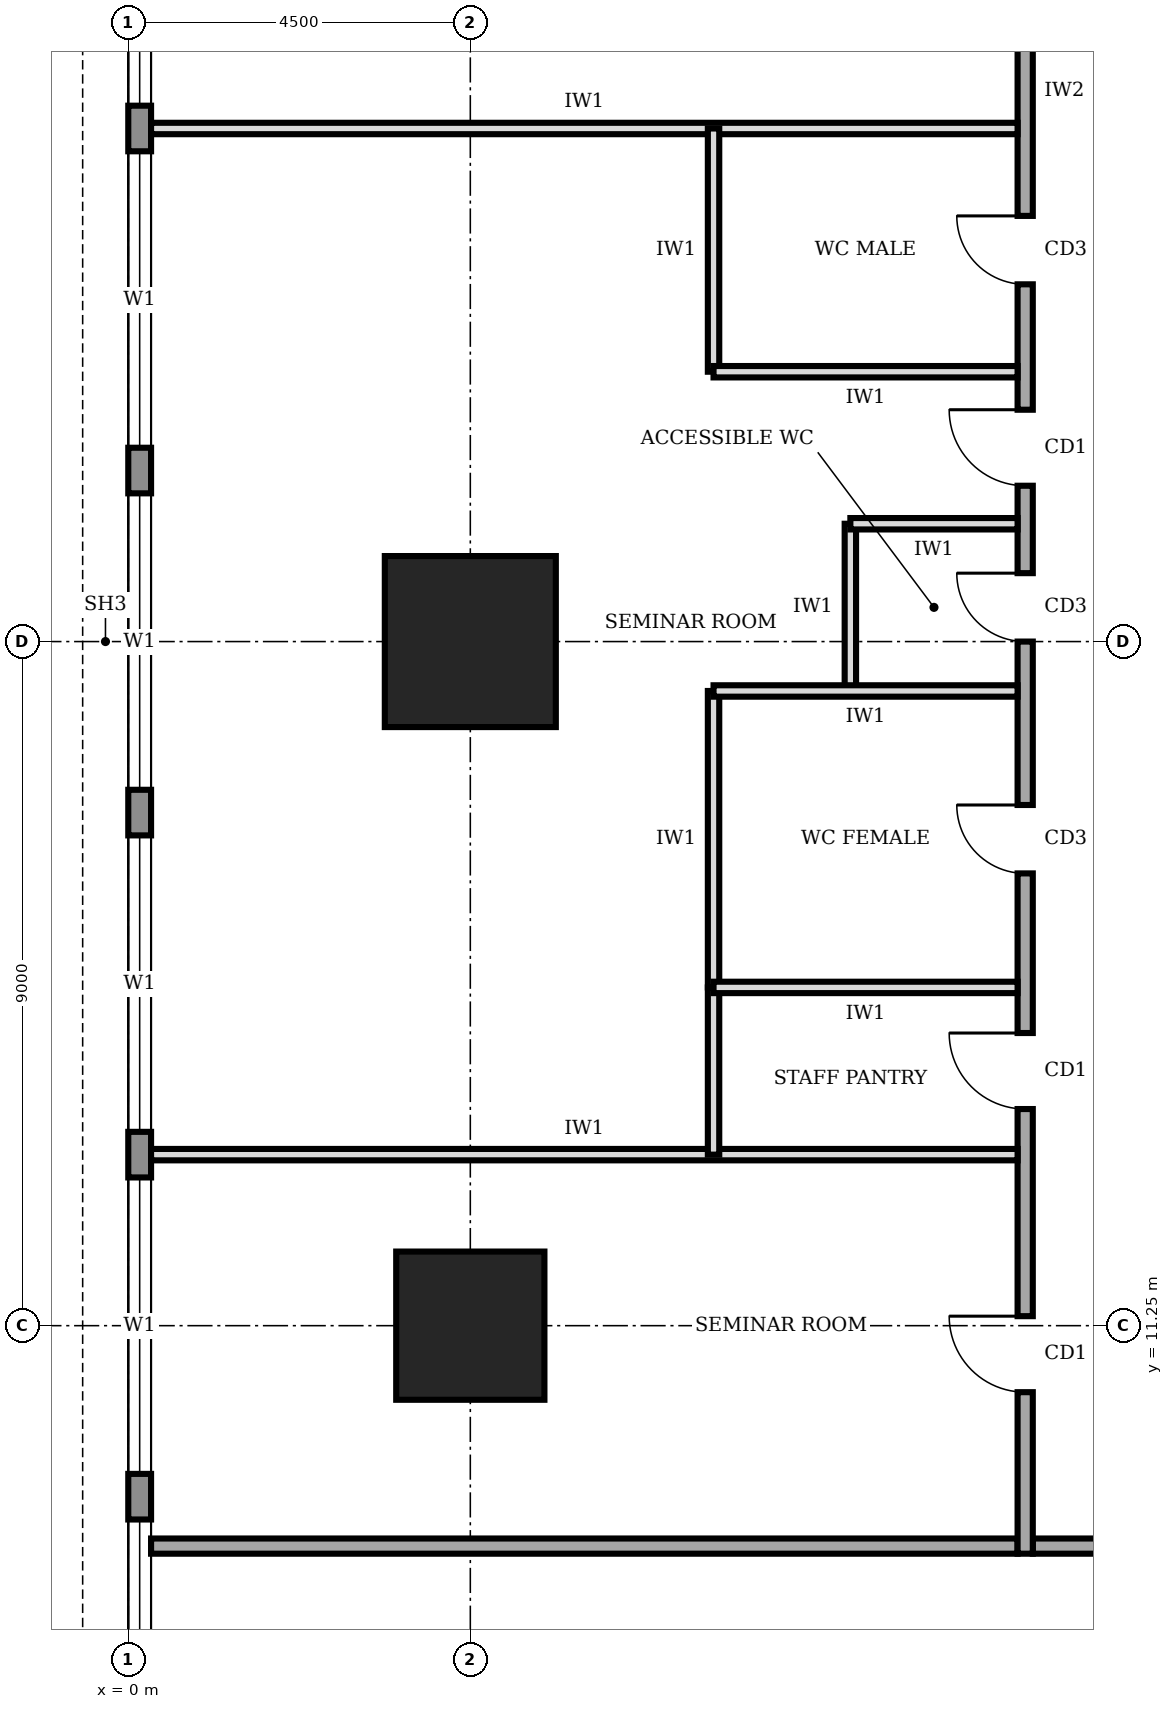
"""IFC4 building model, lengths in metres.
Left out: names, types, materials, properties, quantities, classifications, styles, units other than length and angle.
Written with IfcOpenShell. Run it as: python <this file> out.ifc"""

import sys

from ifc_helpers import new_model, si_unit, direction, frame, frame_2d, origin, origin_2d, place, context, subcontext, project, spatial, rectangle, extrude, element, fill, save


model = new_model("IFC4")
c1 = context("Model", 3, precision=1e-05, world=origin(), true_north=direction((0.0, 1.0)))
c2 = subcontext(c1, "Body", "Model", "MODEL_VIEW")
j1 = project(units=[si_unit("LENGTHUNIT", "METRE"), si_unit("PLANEANGLEUNIT", "RADIAN")], contexts=[c1])
p1 = place(None, origin())
s1 = spatial("IfcSite", under=j1, at=p1, CompositionType="ELEMENT")
p2 = place(p1, origin())
s2 = spatial("IfcBuilding", under=s1, at=p2, CompositionType="ELEMENT")
p3 = place(p2, frame((0.0, 0.0, 225.0)))
s3 = spatial("IfcBuildingStorey", under=s2, at=p3, CompositionType="ELEMENT", Elevation=225.0)
p4 = place(p3, frame((4.5, 11.25, 0.0), z_axis=(0.0, 0.0, 1.0), x_axis=(1.0, 0.0, 0.0)))
e1 = element("IfcColumn", 1, at=p4, inside=s3, PredefinedType="COLUMN", context=c2, shape_type="SweptSolid", body=[
    extrude(rectangle(XDim=1.95, YDim=1.95, at=origin_2d()), origin(), (0.0, 0.0, 1.0), 4.0),
])
p5 = place(p3, frame((4.5, 20.25, 0.0), z_axis=(0.0, 0.0, 1.0), x_axis=(1.0, 0.0, 0.0)))
e2 = element("IfcColumn", 2, at=p5, inside=s3, PredefinedType="COLUMN", context=c2, shape_type="SweptSolid", body=[
    extrude(rectangle(XDim=2.25, YDim=2.25, at=origin_2d()), origin(), (0.0, 0.0, 1.0), 4.0),
])
p6 = place(p3, frame((0.15, 35.98, 0.0), z_axis=(0.0, 0.0, 1.0), x_axis=(0.0, -1.0, 0.0)))
e3 = element("IfcWall", 3, at=p6, inside=s3, PredefinedType="STANDARD", context=c2, shape_type="SweptSolid", body=[
    extrude(rectangle(XDim=31.46, YDim=0.3, at=frame_2d((15.73, 0.0))), origin(), (0.0, 0.0, 1.0), 3.75),
])
p7 = place(p6, frame((27.28, 0.0, 0.9)))
e4 = element("IfcOpeningElement", 4, at=p7, cuts=e3, PredefinedType="OPENING", context=c2, shape_type="SweptSolid", body=[
    extrude(rectangle(XDim=3.9, YDim=2.2, at=frame_2d((1.95, 1.1))), frame((0.0, 0.16, 0.0), z_axis=(0.0, -1.0, 0.0), x_axis=(1.0, 0.0, 0.0)), (0.0, 0.0, 1.0), 0.32),
])
p8 = place(p6, frame((22.78, 0.0, 0.9)))
e5 = element("IfcOpeningElement", 5, at=p8, cuts=e3, PredefinedType="OPENING", context=c2, shape_type="SweptSolid", body=[
    extrude(rectangle(XDim=3.9, YDim=2.2, at=frame_2d((1.95, 1.1))), frame((0.0, 0.16, 0.0), z_axis=(0.0, -1.0, 0.0), x_axis=(1.0, 0.0, 0.0)), (0.0, 0.0, 1.0), 0.32),
])
p9 = place(p6, frame((18.28, 0.0, 0.9)))
e6 = element("IfcOpeningElement", 6, at=p9, cuts=e3, PredefinedType="OPENING", context=c2, shape_type="SweptSolid", body=[
    extrude(rectangle(XDim=3.9, YDim=2.2, at=frame_2d((1.95, 1.1))), frame((0.0, 0.16, 0.0), z_axis=(0.0, -1.0, 0.0), x_axis=(1.0, 0.0, 0.0)), (0.0, 0.0, 1.0), 0.32),
])
p10 = place(p6, frame((13.78, 0.0, 0.9)))
e7 = element("IfcOpeningElement", 7, at=p10, cuts=e3, PredefinedType="OPENING", context=c2, shape_type="SweptSolid", body=[
    extrude(rectangle(XDim=3.9, YDim=2.2, at=frame_2d((1.95, 1.1))), frame((0.0, 0.16, 0.0), z_axis=(0.0, -1.0, 0.0), x_axis=(1.0, 0.0, 0.0)), (0.0, 0.0, 1.0), 0.32),
])
p11 = place(p6, frame((9.28, 0.0, 0.9)))
e8 = element("IfcOpeningElement", 8, at=p11, cuts=e3, PredefinedType="OPENING", context=c2, shape_type="SweptSolid", body=[
    extrude(rectangle(XDim=3.9, YDim=2.2, at=frame_2d((1.95, 1.1))), frame((0.0, 0.16, 0.0), z_axis=(0.0, -1.0, 0.0), x_axis=(1.0, 0.0, 0.0)), (0.0, 0.0, 1.0), 0.32),
])
p12 = place(p6, frame((4.78, 0.0, 0.9)))
e9 = element("IfcOpeningElement", 9, at=p12, cuts=e3, PredefinedType="OPENING", context=c2, shape_type="SweptSolid", body=[
    extrude(rectangle(XDim=3.9, YDim=2.2, at=frame_2d((1.95, 1.1))), frame((0.0, 0.16, 0.0), z_axis=(0.0, -1.0, 0.0), x_axis=(1.0, 0.0, 0.0)), (0.0, 0.0, 1.0), 0.32),
])
p13 = place(p3, frame((11.9, 8.35, 0.0), z_axis=(0.0, 0.0, 1.0), x_axis=(1.0, 0.0, 0.0)))
e10 = element("IfcWall", 10, at=p13, inside=s3, PredefinedType="SOLIDWALL", context=c2, shape_type="SweptSolid", body=[
    extrude(rectangle(XDim=16.9, YDim=0.2, at=frame_2d((8.45, 0.0))), origin(), (0.0, 0.0, 1.0), 3.75),
])
p14 = place(p13, frame((2.05, 0.0, 0.0)))
e11 = element("IfcOpeningElement", 11, at=p14, cuts=e10, PredefinedType="OPENING", context=c2, shape_type="SweptSolid", body=[
    extrude(rectangle(XDim=1.8, YDim=2.1, at=frame_2d((0.9, 1.05))), frame((0.0, 0.11, 0.0), z_axis=(0.0, -1.0, 0.0), x_axis=(1.0, 0.0, 0.0)), (0.0, 0.0, 1.0), 0.22),
])
p15 = place(p13, frame((10.6, 0.0, 0.0)))
e12 = element("IfcOpeningElement", 12, at=p15, cuts=e10, PredefinedType="OPENING", context=c2, shape_type="SweptSolid", body=[
    extrude(rectangle(XDim=1.8, YDim=2.1, at=frame_2d((0.9, 1.05))), frame((0.0, 0.11, 0.0), z_axis=(0.0, -1.0, 0.0), x_axis=(1.0, 0.0, 0.0)), (0.0, 0.0, 1.0), 0.22),
])
p16 = place(p3, frame((11.8, 32.05, 0.0), z_axis=(0.0, 0.0, 1.0), x_axis=(0.0, -1.0, 0.0)))
e13 = element("IfcWall", 13, at=p16, inside=s3, PredefinedType="SOLIDWALL", context=c2, shape_type="SweptSolid", body=[
    extrude(rectangle(XDim=23.8, YDim=0.2, at=frame_2d((11.9, 0.0))), origin(), (0.0, 0.0, 1.0), 3.75),
])
p17 = place(p16, frame((20.675, 0.0, 0.0)))
e14 = element("IfcOpeningElement", 14, at=p17, cuts=e13, PredefinedType="OPENING", context=c2, shape_type="SweptSolid", body=[
    extrude(rectangle(XDim=1.0, YDim=2.1, at=frame_2d((0.5, 1.05))), frame((0.0, 0.11, 0.0), z_axis=(0.0, -1.0, 0.0), x_axis=(1.0, 0.0, 0.0)), (0.0, 0.0, 1.0), 0.22),
])
p18 = place(p16, frame((16.95, 0.0, 0.0)))
e15 = element("IfcOpeningElement", 15, at=p18, cuts=e13, PredefinedType="OPENING", context=c2, shape_type="SweptSolid", body=[
    extrude(rectangle(XDim=1.0, YDim=2.1, at=frame_2d((0.5, 1.05))), frame((0.0, 0.11, 0.0), z_axis=(0.0, -1.0, 0.0), x_axis=(1.0, 0.0, 0.0)), (0.0, 0.0, 1.0), 0.22),
])
p19 = place(p16, frame((13.95, 0.0, 0.0)))
e16 = element("IfcOpeningElement", 16, at=p19, cuts=e13, PredefinedType="OPENING", context=c2, shape_type="SweptSolid", body=[
    extrude(rectangle(XDim=0.9, YDim=2.1, at=frame_2d((0.45, 1.05))), frame((0.0, 0.11, 0.0), z_axis=(0.0, -1.0, 0.0), x_axis=(1.0, 0.0, 0.0)), (0.0, 0.0, 1.0), 0.22),
])
p20 = place(p16, frame((10.9, 0.0, 0.0)))
e17 = element("IfcOpeningElement", 17, at=p20, cuts=e13, PredefinedType="OPENING", context=c2, shape_type="SweptSolid", body=[
    extrude(rectangle(XDim=0.9, YDim=2.1, at=frame_2d((0.45, 1.05))), frame((0.0, 0.11, 0.0), z_axis=(0.0, -1.0, 0.0), x_axis=(1.0, 0.0, 0.0)), (0.0, 0.0, 1.0), 0.22),
])
p21 = place(p16, frame((6.2, 0.0, 0.0)))
e18 = element("IfcOpeningElement", 18, at=p21, cuts=e13, PredefinedType="OPENING", context=c2, shape_type="SweptSolid", body=[
    extrude(rectangle(XDim=0.9, YDim=2.1, at=frame_2d((0.45, 1.05))), frame((0.0, 0.11, 0.0), z_axis=(0.0, -1.0, 0.0), x_axis=(1.0, 0.0, 0.0)), (0.0, 0.0, 1.0), 0.22),
])
p22 = place(p16, frame((8.75, 0.0, 0.0)))
e19 = element("IfcOpeningElement", 19, at=p22, cuts=e13, PredefinedType="OPENING", context=c2, shape_type="SweptSolid", body=[
    extrude(rectangle(XDim=1.0, YDim=2.1, at=frame_2d((0.5, 1.05))), frame((0.0, 0.11, 0.0), z_axis=(0.0, -1.0, 0.0), x_axis=(1.0, 0.0, 0.0)), (0.0, 0.0, 1.0), 0.22),
])
p23 = place(p16, frame((1.925, 0.0, 0.0)))
e20 = element("IfcOpeningElement", 20, at=p23, cuts=e13, PredefinedType="OPENING", context=c2, shape_type="SweptSolid", body=[
    extrude(rectangle(XDim=1.0, YDim=2.1, at=frame_2d((0.5, 1.05))), frame((0.0, 0.11, 0.0), z_axis=(0.0, -1.0, 0.0), x_axis=(1.0, 0.0, 0.0)), (0.0, 0.0, 1.0), 0.22),
])
p24 = place(p3, frame((0.3, 8.35, 0.0), z_axis=(0.0, 0.0, 1.0), x_axis=(1.0, 0.0, 0.0)))
e21 = element("IfcWall", 21, at=p24, inside=s3, PredefinedType="SOLIDWALL", context=c2, shape_type="SweptSolid", body=[
    extrude(rectangle(XDim=11.4, YDim=0.2, at=frame_2d((5.7, 0.0))), origin(), (0.0, 0.0, 1.0), 3.75),
])
for number, where, z_axis, x_axis in (
    (22, (0.3, 13.5, 0.0), (0.0, 0.0, 1.0), (1.0, 0.0, 0.0)),
    (23, (0.3, 27.0, 0.0), (0.0, 0.0, 1.0), (1.0, 0.0, 0.0)),
):
    element("IfcWall", number, at=place(p3, frame(where, z_axis=z_axis, x_axis=x_axis)), inside=s3, PredefinedType="PARTITIONING", context=c2, shape_type="SweptSolid", body=[
        extrude(rectangle(XDim=11.4, YDim=0.15, at=frame_2d((5.7, 0.0))), origin(), (0.0, 0.0, 1.0), 3.75),
    ])
p25 = place(p3, frame((11.7, 15.7, 0.0), z_axis=(0.0, 0.0, 1.0), x_axis=(-1.0, 0.0, 0.0)))
e24 = element("IfcWall", 24, at=p25, inside=s3, PredefinedType="PARTITIONING", context=c2, shape_type="SweptSolid", body=[
    extrude(rectangle(XDim=4.0, YDim=0.15, at=frame_2d((2.0, 0.0))), origin(), (0.0, 0.0, 1.0), 3.75),
])
p26 = place(p3, frame((11.7, 19.6, 0.0), z_axis=(0.0, 0.0, 1.0), x_axis=(-1.0, 0.0, 0.0)))
e25 = element("IfcWall", 25, at=p26, inside=s3, PredefinedType="PARTITIONING", context=c2, shape_type="SweptSolid", body=[
    extrude(rectangle(XDim=4.0, YDim=0.15, at=frame_2d((2.0, 0.0))), origin(), (0.0, 0.0, 1.0), 2.85),
])
p27 = place(p3, frame((11.7, 21.8, 0.0), z_axis=(0.0, 0.0, 1.0), x_axis=(-1.0, 0.0, 0.0)))
e26 = element("IfcWall", 26, at=p27, inside=s3, PredefinedType="PARTITIONING", context=c2, shape_type="SweptSolid", body=[
    extrude(rectangle(XDim=2.2, YDim=0.15, at=frame_2d((1.1, 0.0))), origin(), (0.0, 0.0, 1.0), 3.75),
])
p28 = place(p3, frame((11.7, 23.8, 0.0), z_axis=(0.0, 0.0, 1.0), x_axis=(-1.0, 0.0, 0.0)))
e27 = element("IfcWall", 27, at=p28, inside=s3, PredefinedType="PARTITIONING", context=c2, shape_type="SweptSolid", body=[
    extrude(rectangle(XDim=4.0, YDim=0.15, at=frame_2d((2.0, 0.0))), origin(), (0.0, 0.0, 1.0), 3.75),
])
p29 = place(p3, frame((7.7, 13.5, 0.0), z_axis=(0.0, 0.0, 1.0), x_axis=(0.0, 1.0, 0.0)))
e28 = element("IfcWall", 28, at=p29, inside=s3, PredefinedType="PARTITIONING", context=c2, shape_type="SweptSolid", body=[
    extrude(rectangle(XDim=2.2, YDim=0.15, at=frame_2d((1.1, 0.0))), origin(), (0.0, 0.0, 1.0), 3.75),
])
p30 = place(p3, frame((7.7, 15.7, 0.0), z_axis=(0.0, 0.0, 1.0), x_axis=(0.0, 1.0, 0.0)))
e29 = element("IfcWall", 29, at=p30, inside=s3, PredefinedType="PARTITIONING", context=c2, shape_type="SweptSolid", body=[
    extrude(rectangle(XDim=3.9, YDim=0.15, at=frame_2d((1.95, 0.0))), origin(), (0.0, 0.0, 1.0), 3.75),
])
p31 = place(p3, frame((9.5, 19.6, 0.0), z_axis=(0.0, 0.0, 1.0), x_axis=(0.0, 1.0, 0.0)))
e30 = element("IfcWall", 30, at=p31, inside=s3, PredefinedType="PARTITIONING", context=c2, shape_type="SweptSolid", body=[
    extrude(rectangle(XDim=2.2, YDim=0.15, at=frame_2d((1.1, 0.0))), origin(), (0.0, 0.0, 1.0), 3.75),
])
p32 = place(p3, frame((7.7, 23.8, 0.0), z_axis=(0.0, 0.0, 1.0), x_axis=(0.0, 1.0, 0.0)))
e31 = element("IfcWall", 31, at=p32, inside=s3, PredefinedType="PARTITIONING", context=c2, shape_type="SweptSolid", body=[
    extrude(rectangle(XDim=3.2, YDim=0.15, at=frame_2d((1.6, 0.0))), origin(), (0.0, 0.0, 1.0), 3.75),
])
p33 = place(p7, origin())
e32 = element("IfcWindow", 32, at=p33, inside=s3, PartitioningType="SINGLE_PANEL", PredefinedType="WINDOW", context=c2, shape_type="SweptSolid", body=[
    extrude(rectangle(XDim=3.9, YDim=2.2, at=frame_2d((1.95, 1.1))), frame((0.0, 0.03, 0.0), z_axis=(0.0, -1.0, 0.0), x_axis=(1.0, 0.0, 0.0)), (0.0, 0.0, 1.0), 0.06),
])
fill(e4, e32)
p34 = place(p8, origin())
e33 = element("IfcWindow", 33, at=p34, inside=s3, PartitioningType="SINGLE_PANEL", PredefinedType="WINDOW", context=c2, shape_type="SweptSolid", body=[
    extrude(rectangle(XDim=3.9, YDim=2.2, at=frame_2d((1.95, 1.1))), frame((0.0, 0.03, 0.0), z_axis=(0.0, -1.0, 0.0), x_axis=(1.0, 0.0, 0.0)), (0.0, 0.0, 1.0), 0.06),
])
fill(e5, e33)
p35 = place(p9, origin())
e34 = element("IfcWindow", 34, at=p35, inside=s3, PartitioningType="SINGLE_PANEL", PredefinedType="WINDOW", context=c2, shape_type="SweptSolid", body=[
    extrude(rectangle(XDim=3.9, YDim=2.2, at=frame_2d((1.95, 1.1))), frame((0.0, 0.03, 0.0), z_axis=(0.0, -1.0, 0.0), x_axis=(1.0, 0.0, 0.0)), (0.0, 0.0, 1.0), 0.06),
])
fill(e6, e34)
p36 = place(p10, origin())
e35 = element("IfcWindow", 35, at=p36, inside=s3, PartitioningType="SINGLE_PANEL", PredefinedType="WINDOW", context=c2, shape_type="SweptSolid", body=[
    extrude(rectangle(XDim=3.9, YDim=2.2, at=frame_2d((1.95, 1.1))), frame((0.0, 0.03, 0.0), z_axis=(0.0, -1.0, 0.0), x_axis=(1.0, 0.0, 0.0)), (0.0, 0.0, 1.0), 0.06),
])
fill(e7, e35)
p37 = place(p11, origin())
e36 = element("IfcWindow", 36, at=p37, inside=s3, PartitioningType="SINGLE_PANEL", PredefinedType="WINDOW", context=c2, shape_type="SweptSolid", body=[
    extrude(rectangle(XDim=3.9, YDim=2.2, at=frame_2d((1.95, 1.1))), frame((0.0, 0.03, 0.0), z_axis=(0.0, -1.0, 0.0), x_axis=(1.0, 0.0, 0.0)), (0.0, 0.0, 1.0), 0.06),
])
fill(e8, e36)
p38 = place(p12, origin())
e37 = element("IfcWindow", 37, at=p38, inside=s3, PartitioningType="SINGLE_PANEL", PredefinedType="WINDOW", context=c2, shape_type="SweptSolid", body=[
    extrude(rectangle(XDim=3.9, YDim=2.2, at=frame_2d((1.95, 1.1))), frame((0.0, 0.03, 0.0), z_axis=(0.0, -1.0, 0.0), x_axis=(1.0, 0.0, 0.0)), (0.0, 0.0, 1.0), 0.06),
])
fill(e9, e37)
p39 = place(p17, frame((1.0, 0.0, 0.0), z_axis=(0.0, 0.0, 1.0), x_axis=(-1.0, 0.0, 0.0)))
e38 = element("IfcDoor", 38, at=p39, inside=s3, OperationType="SINGLE_SWING_RIGHT", PredefinedType="DOOR", context=c2, shape_type="SweptSolid", body=[
    extrude(rectangle(XDim=1.0, YDim=2.1, at=frame_2d((0.5, 1.05))), frame((0.0, 0.025, 0.0), z_axis=(0.0, -1.0, 0.0), x_axis=(1.0, 0.0, 0.0)), (0.0, 0.0, 1.0), 0.05),
])
fill(e14, e38)
p40 = place(p18, frame((1.0, 0.0, 0.0), z_axis=(0.0, 0.0, 1.0), x_axis=(-1.0, 0.0, 0.0)))
e39 = element("IfcDoor", 39, at=p40, inside=s3, OperationType="SINGLE_SWING_RIGHT", PredefinedType="DOOR", context=c2, shape_type="SweptSolid", body=[
    extrude(rectangle(XDim=1.0, YDim=2.1, at=frame_2d((0.5, 1.05))), frame((0.0, 0.025, 0.0), z_axis=(0.0, -1.0, 0.0), x_axis=(1.0, 0.0, 0.0)), (0.0, 0.0, 1.0), 0.05),
])
fill(e15, e39)
p41 = place(p19, frame((0.9, 0.0, 0.0), z_axis=(0.0, 0.0, 1.0), x_axis=(-1.0, 0.0, 0.0)))
e40 = element("IfcDoor", 40, at=p41, inside=s3, OperationType="SINGLE_SWING_RIGHT", PredefinedType="DOOR", context=c2, shape_type="SweptSolid", body=[
    extrude(rectangle(XDim=0.9, YDim=2.1, at=frame_2d((0.45, 1.05))), frame((0.0, 0.025, 0.0), z_axis=(0.0, -1.0, 0.0), x_axis=(1.0, 0.0, 0.0)), (0.0, 0.0, 1.0), 0.05),
])
fill(e16, e40)
p42 = place(p20, frame((0.9, 0.0, 0.0), z_axis=(0.0, 0.0, 1.0), x_axis=(-1.0, 0.0, 0.0)))
e41 = element("IfcDoor", 41, at=p42, inside=s3, OperationType="SINGLE_SWING_RIGHT", PredefinedType="DOOR", context=c2, shape_type="SweptSolid", body=[
    extrude(rectangle(XDim=0.9, YDim=2.1, at=frame_2d((0.45, 1.05))), frame((0.0, 0.025, 0.0), z_axis=(0.0, -1.0, 0.0), x_axis=(1.0, 0.0, 0.0)), (0.0, 0.0, 1.0), 0.05),
])
fill(e17, e41)
p43 = place(p21, frame((0.9, 0.0, 0.0), z_axis=(0.0, 0.0, 1.0), x_axis=(-1.0, 0.0, 0.0)))
e42 = element("IfcDoor", 42, at=p43, inside=s3, OperationType="SINGLE_SWING_RIGHT", PredefinedType="DOOR", context=c2, shape_type="SweptSolid", body=[
    extrude(rectangle(XDim=0.9, YDim=2.1, at=frame_2d((0.45, 1.05))), frame((0.0, 0.025, 0.0), z_axis=(0.0, -1.0, 0.0), x_axis=(1.0, 0.0, 0.0)), (0.0, 0.0, 1.0), 0.05),
])
fill(e18, e42)
p44 = place(p22, frame((1.0, 0.0, 0.0), z_axis=(0.0, 0.0, 1.0), x_axis=(-1.0, 0.0, 0.0)))
e43 = element("IfcDoor", 43, at=p44, inside=s3, OperationType="SINGLE_SWING_RIGHT", PredefinedType="DOOR", context=c2, shape_type="SweptSolid", body=[
    extrude(rectangle(XDim=1.0, YDim=2.1, at=frame_2d((0.5, 1.05))), frame((0.0, 0.025, 0.0), z_axis=(0.0, -1.0, 0.0), x_axis=(1.0, 0.0, 0.0)), (0.0, 0.0, 1.0), 0.05),
])
fill(e19, e43)
save(model, sys.argv[1])
